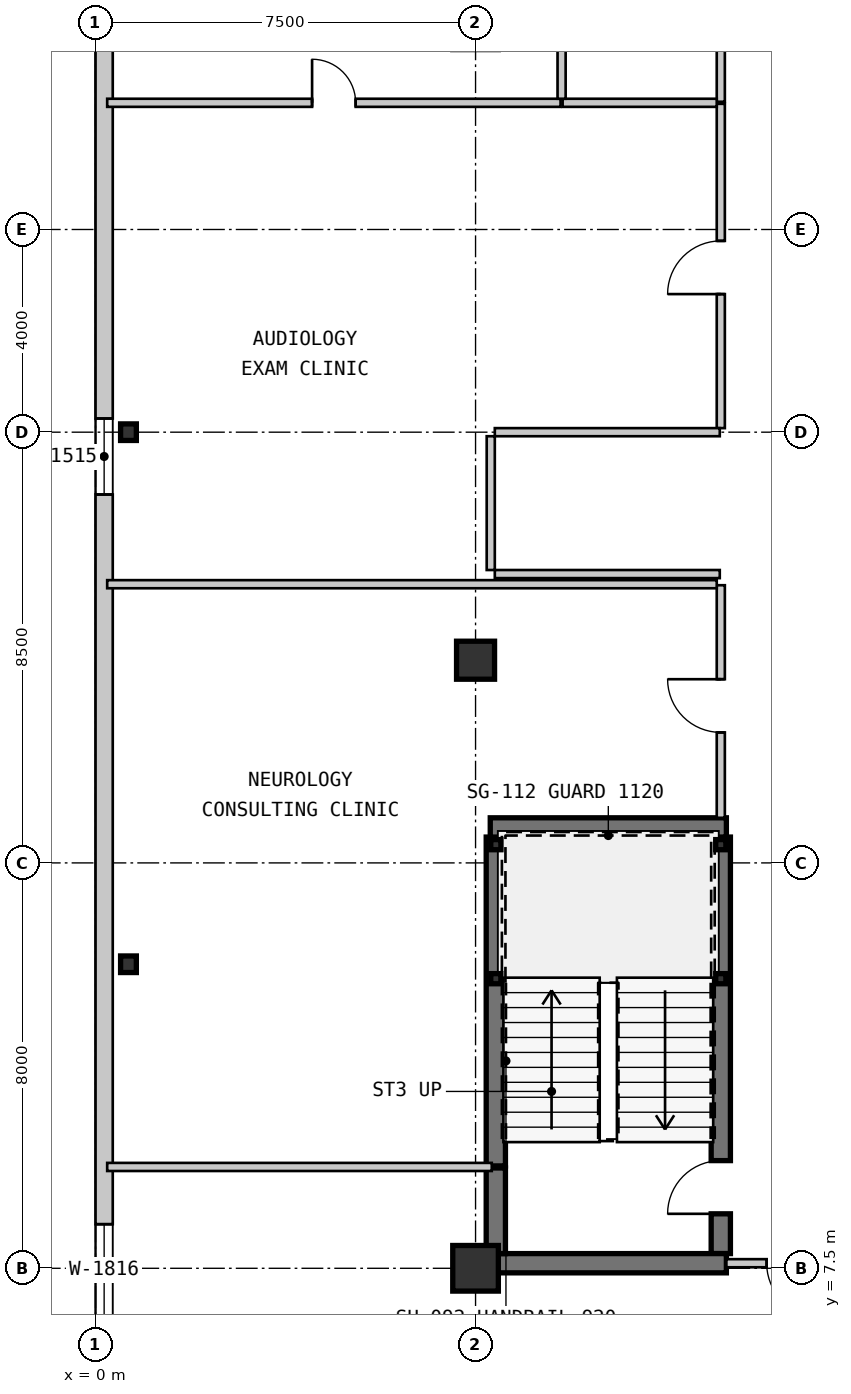
"""IFC4 building model, lengths in metres.
Left out: names, types, materials, properties, quantities, classifications, styles, units other than length and angle.
Written with IfcOpenShell. Run it as: python <this file> out.ifc"""

import sys

from ifc_helpers import new_model, si_unit, direction, frame, frame_2d, origin, origin_2d, place, context, subcontext, project, spatial, rectangle, hollow_rectangle, circle, i_section, extrude, source, transform, mapped, element, fill, save


model = new_model("IFC4")
c1 = context("Model", 3, precision=1e-05, world=origin(), true_north=direction((0.0, 1.0)))
c2 = subcontext(c1, "Body", "Model", "MODEL_VIEW")
j1 = project(units=[si_unit("LENGTHUNIT", "METRE"), si_unit("PLANEANGLEUNIT", "RADIAN")], contexts=[c1])
p1 = place(None, origin())
s1 = spatial("IfcSite", under=j1, at=p1, CompositionType="ELEMENT")
p2 = place(p1, origin())
s2 = spatial("IfcBuilding", under=s1, at=p2, CompositionType="ELEMENT")
p3 = place(p2, frame((0.0, 0.0, 4.55)))
s3 = spatial("IfcBuildingStorey", under=s2, at=p3, CompositionType="ELEMENT", Elevation=4.55)
m1 = source(origin(), c2, "Body", "SweptSolid", [
    extrude(circle(Radius=0.45, at=origin_2d()), origin(), (0.0, 0.0, 1.0), 3.85),
])
p4 = place(p3, frame((7.5, 7.5, 0.0), z_axis=(0.0, 0.0, 1.0), x_axis=(1.0, 0.0, 0.0)))
e1 = element("IfcColumn", 1, at=p4, inside=s3, PredefinedType="COLUMN", context=c2, shape_type="MappedRepresentation", body=[
    mapped(m1, transform((0.0, 0.0, 0.0), scale=1.0)),
])
m2 = source(origin(), c2, "Body", "SweptSolid", [
    extrude(circle(Radius=0.375, at=origin_2d()), origin(), (0.0, 0.0, 1.0), 3.85),
])
p5 = place(p3, frame((7.5, 19.5, 0.0), z_axis=(0.0, 0.0, 1.0), x_axis=(1.0, 0.0, 0.0)))
e2 = element("IfcColumn", 2, at=p5, inside=s3, PredefinedType="COLUMN", context=c2, shape_type="MappedRepresentation", body=[
    mapped(m2, transform((0.0, 0.0, 0.0), scale=1.0)),
])
m3 = source(origin(), c2, "Body", "SweptSolid", [
    extrude(i_section(OverallWidth=0.311, OverallDepth=0.327, WebThickness=0.016, FlangeThickness=0.025, at=origin_2d()), origin(), (0.0, 0.0, 1.0), 3.85),
])
for number, where, z_axis, x_axis in (
    (3, (0.65, 13.5, 0.0), (0.0, 0.0, 1.0), (1.0, 0.0, 0.0)),
    (4, (0.65, 24.0, 0.0), (0.0, 0.0, 1.0), (1.0, 0.0, 0.0)),
):
    element("IfcColumn", number, at=place(p3, frame(where, z_axis=z_axis, x_axis=x_axis)), inside=s3, PredefinedType="COLUMN", context=c2, shape_type="MappedRepresentation", body=[
        mapped(m3, transform((0.0, 0.0, 0.0), scale=1.0)),
    ])
m4 = source(origin(), c2, "Body", "SweptSolid", [
    extrude(hollow_rectangle(XDim=0.2, YDim=0.2, WallThickness=0.009, at=origin_2d()), origin(), (0.0, 0.0, 1.0), 3.85),
])
for number, where, z_axis, x_axis in (
    (5, (7.9, 13.215, 0.0), (0.0, 0.0, 1.0), (1.0, 0.0, 0.0)),
    (6, (12.34, 13.215, 0.0), (0.0, 0.0, 1.0), (1.0, 0.0, 0.0)),
    (7, (7.9, 15.86, 0.0), (0.0, 0.0, 1.0), (1.0, 0.0, 0.0)),
    (8, (12.34, 15.86, 0.0), (0.0, 0.0, 1.0), (1.0, 0.0, 0.0)),
):
    element("IfcColumn", number, at=place(p3, frame(where, z_axis=z_axis, x_axis=x_axis)), inside=s3, PredefinedType="COLUMN", context=c2, shape_type="MappedRepresentation", body=[
        mapped(m4, transform((0.0, 0.0, 0.0), scale=1.0)),
    ])
m5 = source(origin(), c2, "Body", "SweptSolid", [
    extrude(rectangle(XDim=39.66, YDim=0.34, at=frame_2d((19.83, 0.0))), origin(), (0.0, 0.0, 1.0), 3.59),
])
p6 = place(p3, frame((0.17, 0.17, 0.0), z_axis=(0.0, 0.0, 1.0), x_axis=(0.0, 1.0, 0.0)))
e9 = element("IfcWall", 9, at=p6, inside=s3, PredefinedType="SOLIDWALL", context=c2, shape_type="MappedRepresentation", body=[
    mapped(m5, transform((0.0, 0.0, 0.0), scale=1.0)),
])
m6 = source(origin(), c2, "Body", "SweptSolid", [
    extrude(rectangle(XDim=2.4, YDim=1.8, at=frame_2d((1.2, 0.9))), frame((0.0, 0.18, 0.0), z_axis=(0.0, -1.0, 0.0), x_axis=(1.0, 0.0, 0.0)), (0.0, 0.0, 1.0), 0.36),
])
p7 = place(p6, frame((3.2, 0.0, 0.95)))
e10 = element("IfcOpeningElement", 10, at=p7, cuts=e9, PredefinedType="OPENING", context=c2, shape_type="MappedRepresentation", body=[
    mapped(m6, transform((0.0, 0.0, 0.0), scale=1.0)),
])
m7 = source(origin(), c2, "Body", "SweptSolid", [
    extrude(rectangle(XDim=1.8, YDim=1.6, at=frame_2d((0.9, 0.8))), frame((0.0, 0.18, 0.0), z_axis=(0.0, -1.0, 0.0), x_axis=(1.0, 0.0, 0.0)), (0.0, 0.0, 1.0), 0.36),
])
p8 = place(p6, frame((6.4, 0.0, 0.95)))
e11 = element("IfcOpeningElement", 11, at=p8, cuts=e9, PredefinedType="OPENING", context=c2, shape_type="MappedRepresentation", body=[
    mapped(m7, transform((0.0, 0.0, 0.0), scale=1.0)),
])
m8 = source(origin(), c2, "Body", "SweptSolid", [
    extrude(rectangle(XDim=1.5, YDim=1.5, at=frame_2d((0.75, 0.75))), frame((0.0, 0.18, 0.0), z_axis=(0.0, -1.0, 0.0), x_axis=(1.0, 0.0, 0.0)), (0.0, 0.0, 1.0), 0.36),
])
p9 = place(p6, frame((22.6, 0.0, 0.95)))
e12 = element("IfcOpeningElement", 12, at=p9, cuts=e9, PredefinedType="OPENING", context=c2, shape_type="MappedRepresentation", body=[
    mapped(m8, transform((0.0, 0.0, 0.0), scale=1.0)),
])
m9 = source(origin(), c2, "Body", "SweptSolid", [
    extrude(rectangle(XDim=1.2, YDim=1.5, at=frame_2d((0.6, 0.75))), frame((0.0, 0.18, 0.0), z_axis=(0.0, -1.0, 0.0), x_axis=(1.0, 0.0, 0.0)), (0.0, 0.0, 1.0), 0.36),
])
p10 = place(p6, frame((34.6, 0.0, 0.95)))
e13 = element("IfcOpeningElement", 13, at=p10, cuts=e9, PredefinedType="OPENING", context=c2, shape_type="MappedRepresentation", body=[
    mapped(m9, transform((0.0, 0.0, 0.0), scale=1.0)),
])
m10 = source(origin(), c2, "Body", "SweptSolid", [
    extrude(rectangle(XDim=8.22, YDim=0.38, at=frame_2d((4.11, 0.0))), origin(), (0.0, 0.0, 1.0), 3.59),
])
p11 = place(p3, frame((12.34, 16.01, 0.0), z_axis=(0.0, 0.0, 1.0), x_axis=(0.0, -1.0, 0.0)))
e14 = element("IfcWall", 14, at=p11, inside=s3, PredefinedType="SHEAR", context=c2, shape_type="MappedRepresentation", body=[
    mapped(m10, transform((0.0, 0.0, 0.0), scale=1.0)),
])
m11 = source(origin(), c2, "Body", "SweptSolid", [
    extrude(rectangle(XDim=1.05, YDim=2.1, at=frame_2d((0.525, 1.05))), frame((0.0, 0.2, 0.0), z_axis=(0.0, -1.0, 0.0), x_axis=(1.0, 0.0, 0.0)), (0.0, 0.0, 1.0), 0.4),
])
p12 = place(p11, frame((6.385, 0.0, 0.0)))
e15 = element("IfcOpeningElement", 15, at=p12, cuts=e14, PredefinedType="OPENING", context=c2, shape_type="MappedRepresentation", body=[
    mapped(m11, transform((0.0, 0.0, 0.0), scale=1.0)),
])
m12 = source(origin(), c2, "Body", "SweptSolid", [
    extrude(rectangle(XDim=4.66, YDim=0.38, at=frame_2d((2.33, 0.0))), origin(), (0.0, 0.0, 1.0), 3.59),
])
p13 = place(p3, frame((12.45, 7.6, 0.0), z_axis=(0.0, 0.0, 1.0), x_axis=(-1.0, 0.0, 0.0)))
e16 = element("IfcWall", 16, at=p13, inside=s3, PredefinedType="SHEAR", context=c2, shape_type="MappedRepresentation", body=[
    mapped(m12, transform((0.0, 0.0, 0.0), scale=1.0)),
])
m13 = source(origin(), c2, "Body", "SweptSolid", [
    extrude(rectangle(XDim=1.69, YDim=0.38, at=frame_2d((0.845, 0.0))), origin(), (0.0, 0.0, 1.0), 3.59),
])
p14 = place(p3, frame((7.9, 7.79, 0.0), z_axis=(0.0, 0.0, 1.0), x_axis=(0.0, 1.0, 0.0)))
e17 = element("IfcWall", 17, at=p14, inside=s3, PredefinedType="SHEAR", context=c2, shape_type="MappedRepresentation", body=[
    mapped(m13, transform((0.0, 0.0, 0.0), scale=1.0)),
])
m14 = source(origin(), c2, "Body", "SweptSolid", [
    extrude(rectangle(XDim=6.49, YDim=0.38, at=frame_2d((3.245, 0.0))), origin(), (0.0, 0.0, 1.0), 3.59),
])
p15 = place(p3, frame((7.9, 9.52, 0.0), z_axis=(0.0, 0.0, 1.0), x_axis=(0.0, 1.0, 0.0)))
e18 = element("IfcWall", 18, at=p15, inside=s3, PredefinedType="SHEAR", context=c2, shape_type="MappedRepresentation", body=[
    mapped(m14, transform((0.0, 0.0, 0.0), scale=1.0)),
])
p16 = place(p3, frame((7.79, 16.2, 0.0), z_axis=(0.0, 0.0, 1.0), x_axis=(1.0, 0.0, 0.0)))
e19 = element("IfcWall", 19, at=p16, inside=s3, PredefinedType="SHEAR", context=c2, shape_type="MappedRepresentation", body=[
    mapped(m12, transform((0.0, 0.0, 0.0), scale=1.0)),
])
m15 = source(origin(), c2, "Body", "SweptSolid", [
    extrude(rectangle(XDim=2.67, YDim=0.16, at=frame_2d((1.335, 0.0))), origin(), (0.0, 0.0, 1.0), 3.59),
])
p17 = place(p3, frame((15.12, 7.6, 0.0), z_axis=(0.0, 0.0, 1.0), x_axis=(-1.0, 0.0, 0.0)))
e20 = element("IfcWall", 20, at=p17, inside=s3, PredefinedType="PARTITIONING", context=c2, shape_type="MappedRepresentation", body=[
    mapped(m15, transform((0.0, 0.0, 0.0), scale=1.0)),
])
m16 = source(origin(), c2, "Body", "SweptSolid", [
    extrude(rectangle(XDim=1.05, YDim=2.1, at=frame_2d((0.525, 1.05))), frame((0.0, 0.09, 0.0), z_axis=(0.0, -1.0, 0.0), x_axis=(1.0, 0.0, 0.0)), (0.0, 0.0, 1.0), 0.18),
])
p18 = place(p17, frame((0.825, 0.0, 0.0)))
e21 = element("IfcOpeningElement", 21, at=p18, cuts=e20, PredefinedType="OPENING", context=c2, shape_type="MappedRepresentation", body=[
    mapped(m16, transform((0.0, 0.0, 0.0), scale=1.0)),
])
m17 = source(origin(), c2, "Body", "SweptSolid", [
    extrude(rectangle(XDim=4.59, YDim=0.16, at=frame_2d((2.295, 0.0))), origin(), (0.0, 0.0, 1.0), 3.59),
])
p19 = place(p3, frame((12.34, 16.39, 0.0), z_axis=(0.0, 0.0, 1.0), x_axis=(0.0, 1.0, 0.0)))
e22 = element("IfcWall", 22, at=p19, inside=s3, PredefinedType="PARTITIONING", context=c2, shape_type="MappedRepresentation", body=[
    mapped(m17, transform((0.0, 0.0, 0.0), scale=1.0)),
])
p20 = place(p19, frame((1.685, 0.0, 0.0)))
e23 = element("IfcOpeningElement", 23, at=p20, cuts=e22, PredefinedType="OPENING", context=c2, shape_type="MappedRepresentation", body=[
    mapped(m16, transform((0.0, 0.0, 0.0), scale=1.0)),
])
m18 = source(origin(), c2, "Body", "SweptSolid", [
    extrude(rectangle(XDim=6.4, YDim=0.16, at=frame_2d((3.2, 0.0))), origin(), (0.0, 0.0, 1.0), 3.59),
])
p21 = place(p3, frame((12.34, 24.08, 0.0), z_axis=(0.0, 0.0, 1.0), x_axis=(0.0, 1.0, 0.0)))
e24 = element("IfcWall", 24, at=p21, inside=s3, PredefinedType="PARTITIONING", context=c2, shape_type="MappedRepresentation", body=[
    mapped(m18, transform((0.0, 0.0, 0.0), scale=1.0)),
])
p22 = place(p21, frame((2.645, 0.0, 0.0)))
e25 = element("IfcOpeningElement", 25, at=p22, cuts=e24, PredefinedType="OPENING", context=c2, shape_type="MappedRepresentation", body=[
    mapped(m16, transform((0.0, 0.0, 0.0), scale=1.0)),
])
m19 = source(origin(), c2, "Body", "SweptSolid", [
    extrude(rectangle(XDim=4.44, YDim=0.16, at=frame_2d((2.22, 0.0))), origin(), (0.0, 0.0, 1.0), 3.59),
])
for number, where, z_axis, x_axis in (
    (26, (12.32, 21.2, 0.0), (0.0, 0.0, 1.0), (-1.0, 0.0, 0.0)),
    (27, (7.88, 24.0, 0.0), (0.0, 0.0, 1.0), (1.0, 0.0, 0.0)),
):
    element("IfcWall", number, at=place(p3, frame(where, z_axis=z_axis, x_axis=x_axis)), inside=s3, PredefinedType="PARTITIONING", context=c2, shape_type="MappedRepresentation", body=[
        mapped(m19, transform((0.0, 0.0, 0.0), scale=1.0)),
    ])
m20 = source(origin(), c2, "Body", "SweptSolid", [
    extrude(rectangle(XDim=2.64, YDim=0.16, at=frame_2d((1.32, 0.0))), origin(), (0.0, 0.0, 1.0), 3.59),
])
p23 = place(p3, frame((7.8, 21.28, 0.0), z_axis=(0.0, 0.0, 1.0), x_axis=(0.0, 1.0, 0.0)))
e28 = element("IfcWall", 28, at=p23, inside=s3, PredefinedType="PARTITIONING", context=c2, shape_type="MappedRepresentation", body=[
    mapped(m20, transform((0.0, 0.0, 0.0), scale=1.0)),
])
m21 = source(origin(), c2, "Body", "SweptSolid", [
    extrude(rectangle(XDim=5.4, YDim=0.16, at=frame_2d((2.7, 0.0))), origin(), (0.0, 0.0, 1.0), 3.59),
])
p24 = place(p3, frame((12.34, 30.52, 0.0), z_axis=(0.0, 0.0, 1.0), x_axis=(0.0, 1.0, 0.0)))
e29 = element("IfcWall", 29, at=p24, inside=s3, PredefinedType="PARTITIONING", context=c2, shape_type="MappedRepresentation", body=[
    mapped(m21, transform((0.0, 0.0, 0.0), scale=1.0)),
])
p25 = place(p24, frame((2.175, 0.0, 0.0)))
e30 = element("IfcOpeningElement", 30, at=p25, cuts=e29, PredefinedType="OPENING", context=c2, shape_type="MappedRepresentation", body=[
    mapped(m16, transform((0.0, 0.0, 0.0), scale=1.0)),
])
m22 = source(origin(), c2, "Body", "SweptSolid", [
    extrude(rectangle(XDim=7.59, YDim=0.16, at=frame_2d((3.795, 0.0))), origin(), (0.0, 0.0, 1.0), 3.59),
])
p26 = place(p3, frame((0.23, 9.5, 0.0), z_axis=(0.0, 0.0, 1.0), x_axis=(1.0, 0.0, 0.0)))
e31 = element("IfcWall", 31, at=p26, inside=s3, PredefinedType="PARTITIONING", context=c2, shape_type="MappedRepresentation", body=[
    mapped(m22, transform((0.0, 0.0, 0.0), scale=1.0)),
])
m23 = source(origin(), c2, "Body", "SweptSolid", [
    extrude(rectangle(XDim=12.03, YDim=0.16, at=frame_2d((6.015, 0.0))), origin(), (0.0, 0.0, 1.0), 3.59),
])
p27 = place(p3, frame((0.23, 21.0, 0.0), z_axis=(0.0, 0.0, 1.0), x_axis=(1.0, 0.0, 0.0)))
e32 = element("IfcWall", 32, at=p27, inside=s3, PredefinedType="PARTITIONING", context=c2, shape_type="MappedRepresentation", body=[
    mapped(m23, transform((0.0, 0.0, 0.0), scale=1.0)),
])
m24 = source(origin(), c2, "Body", "SweptSolid", [
    extrude(rectangle(XDim=8.948, YDim=0.16, at=frame_2d((4.474, 0.0))), origin(), (0.0, 0.0, 1.0), 3.59),
])
p28 = place(p3, frame((0.23, 30.5, 0.0), z_axis=(0.0, 0.0, 1.0), x_axis=(1.0, 0.0, 0.0)))
e33 = element("IfcWall", 33, at=p28, inside=s3, PredefinedType="PARTITIONING", context=c2, shape_type="MappedRepresentation", body=[
    mapped(m24, transform((0.0, 0.0, 0.0), scale=1.0)),
])
m25 = source(origin(), c2, "Body", "SweptSolid", [
    extrude(rectangle(XDim=0.86, YDim=2.1, at=frame_2d((0.43, 1.05))), frame((0.0, 0.09, 0.0), z_axis=(0.0, -1.0, 0.0), x_axis=(1.0, 0.0, 0.0)), (0.0, 0.0, 1.0), 0.18),
])
p29 = place(p28, frame((4.044, 0.0, 0.0)))
e34 = element("IfcOpeningElement", 34, at=p29, cuts=e33, PredefinedType="OPENING", context=c2, shape_type="MappedRepresentation", body=[
    mapped(m25, transform((0.0, 0.0, 0.0), scale=1.0)),
])
m26 = source(origin(), c2, "Body", "SweptSolid", [
    extrude(rectangle(XDim=3.042, YDim=0.16, at=frame_2d((1.521, 0.0))), origin(), (0.0, 0.0, 1.0), 3.59),
])
p30 = place(p3, frame((9.218, 30.5, 0.0), z_axis=(0.0, 0.0, 1.0), x_axis=(1.0, 0.0, 0.0)))
e35 = element("IfcWall", 35, at=p30, inside=s3, PredefinedType="PARTITIONING", context=c2, shape_type="MappedRepresentation", body=[
    mapped(m26, transform((0.0, 0.0, 0.0), scale=1.0)),
])
m27 = source(origin(), c2, "Body", "SweptSolid", [
    extrude(rectangle(XDim=9.19, YDim=0.16, at=frame_2d((4.595, 0.0))), origin(), (0.0, 0.0, 1.0), 3.59),
])
p31 = place(p3, frame((9.198, 39.77, 0.0), z_axis=(0.0, 0.0, 1.0), x_axis=(0.0, -1.0, 0.0)))
e36 = element("IfcWall", 36, at=p31, inside=s3, PredefinedType="PARTITIONING", context=c2, shape_type="MappedRepresentation", body=[
    mapped(m27, transform((0.0, 0.0, 0.0), scale=1.0)),
])
m28 = source(origin(), c2, "Body", "SweptSolid", [
    extrude(rectangle(XDim=1.8, YDim=1.6, at=frame_2d((0.9, 0.8))), frame((0.0, 0.03, 0.0), z_axis=(0.0, -1.0, 0.0), x_axis=(1.0, 0.0, 0.0)), (0.0, 0.0, 1.0), 0.06),
])
p32 = place(p8, origin())
e37 = element("IfcWindow", 37, at=p32, inside=s3, PartitioningType="SINGLE_PANEL", PredefinedType="WINDOW", context=c2, shape_type="MappedRepresentation", body=[
    mapped(m28, transform((0.0, 0.0, 0.0), scale=1.0)),
])
fill(e11, e37)
m29 = source(origin(), c2, "Body", "SweptSolid", [
    extrude(rectangle(XDim=1.5, YDim=1.5, at=frame_2d((0.75, 0.75))), frame((0.0, 0.03, 0.0), z_axis=(0.0, -1.0, 0.0), x_axis=(1.0, 0.0, 0.0)), (0.0, 0.0, 1.0), 0.06),
])
p33 = place(p9, origin())
e38 = element("IfcWindow", 38, at=p33, inside=s3, PartitioningType="SINGLE_PANEL", PredefinedType="WINDOW", context=c2, shape_type="MappedRepresentation", body=[
    mapped(m29, transform((0.0, 0.0, 0.0), scale=1.0)),
])
fill(e12, e38)
m30 = source(origin(), c2, "Body", "SweptSolid", [
    extrude(rectangle(XDim=1.05, YDim=2.1, at=frame_2d((0.525, 1.05))), frame((0.0, 0.025, 0.0), z_axis=(0.0, -1.0, 0.0), x_axis=(1.0, 0.0, 0.0)), (0.0, 0.0, 1.0), 0.05),
])
p34 = place(p12, frame((1.05, 0.0, 0.0), z_axis=(0.0, 0.0, 1.0), x_axis=(-1.0, 0.0, 0.0)))
e39 = element("IfcDoor", 39, at=p34, inside=s3, OperationType="SINGLE_SWING_LEFT", PredefinedType="DOOR", context=c2, shape_type="MappedRepresentation", body=[
    mapped(m30, transform((0.0, 0.0, 0.0), scale=1.0)),
])
fill(e15, e39)
p35 = place(p18, origin())
e40 = element("IfcDoor", 40, at=p35, inside=s3, OperationType="SINGLE_SWING_LEFT", PredefinedType="DOOR", context=c2, shape_type="MappedRepresentation", body=[
    mapped(m30, transform((0.0, 0.0, 0.0), scale=1.0)),
])
fill(e21, e40)
p36 = place(p20, origin())
e41 = element("IfcDoor", 41, at=p36, inside=s3, OperationType="SINGLE_SWING_RIGHT", PredefinedType="DOOR", context=c2, shape_type="MappedRepresentation", body=[
    mapped(m30, transform((0.0, 0.0, 0.0), scale=1.0)),
])
fill(e23, e41)
p37 = place(p22, origin())
e42 = element("IfcDoor", 42, at=p37, inside=s3, OperationType="SINGLE_SWING_LEFT", PredefinedType="DOOR", context=c2, shape_type="MappedRepresentation", body=[
    mapped(m30, transform((0.0, 0.0, 0.0), scale=1.0)),
])
fill(e25, e42)
m31 = source(origin(), c2, "Body", "SweptSolid", [
    extrude(rectangle(XDim=0.86, YDim=2.1, at=frame_2d((0.43, 1.05))), frame((0.0, 0.025, 0.0), z_axis=(0.0, -1.0, 0.0), x_axis=(1.0, 0.0, 0.0)), (0.0, 0.0, 1.0), 0.05),
])
p38 = place(p29, origin())
e43 = element("IfcDoor", 43, at=p38, inside=s3, OperationType="SINGLE_SWING_LEFT", PredefinedType="DOOR", context=c2, shape_type="MappedRepresentation", body=[
    mapped(m31, transform((0.0, 0.0, 0.0), scale=1.0)),
])
fill(e34, e43)
save(model, sys.argv[1])
